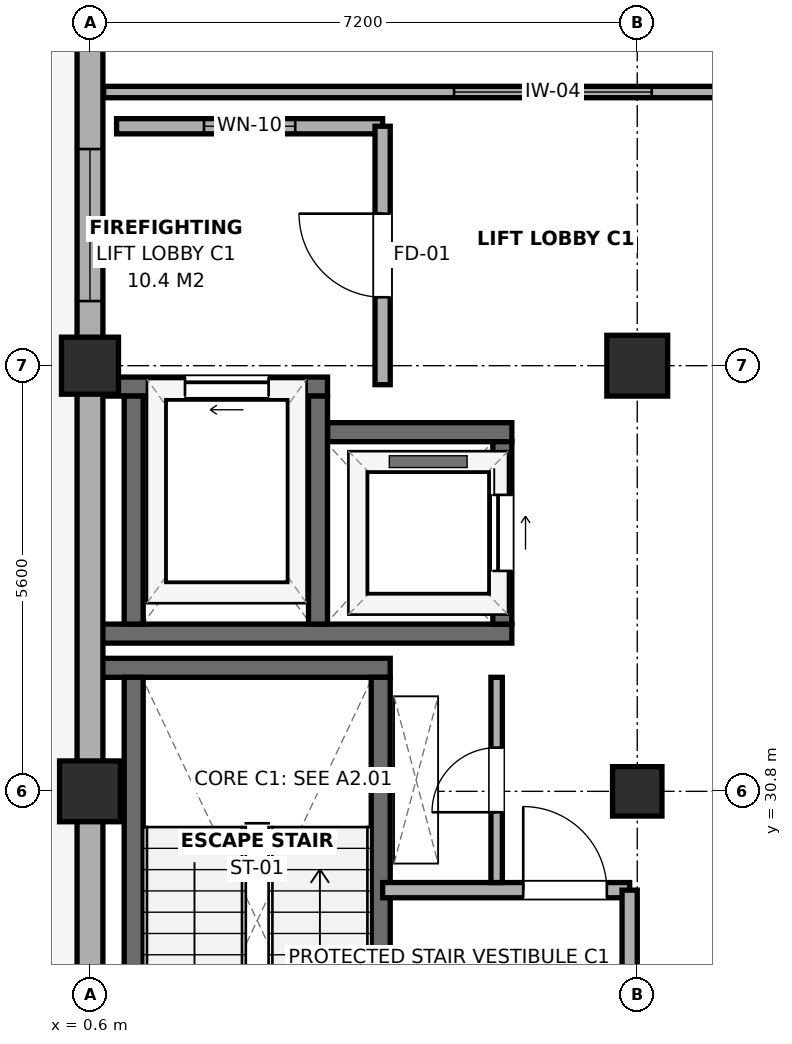
"""IFC4 building model, lengths in metres.
Left out: names, types, materials, properties, quantities, classifications, styles, units other than length and angle.
Written with IfcOpenShell. Run it as: python <this file> out.ifc"""

import sys

from ifc_helpers import new_model, si_unit, direction, frame, frame_2d, origin, origin_2d, place, context, subcontext, project, spatial, rectangle, extrude, element, fill, save


model = new_model("IFC4")
c1 = context("Model", 3, precision=1e-05, world=origin(), true_north=direction((0.0, 1.0)))
c2 = subcontext(c1, "Body", "Model", "MODEL_VIEW")
j1 = project(units=[si_unit("LENGTHUNIT", "METRE"), si_unit("PLANEANGLEUNIT", "RADIAN")], contexts=[c1])
p1 = place(None, origin())
s1 = spatial("IfcSite", under=j1, at=p1, CompositionType="ELEMENT")
p2 = place(p1, origin())
s2 = spatial("IfcBuilding", under=s1, at=p2, CompositionType="ELEMENT")
p3 = place(p2, frame((0.0, 0.0, 4.8)))
s3 = spatial("IfcBuildingStorey", under=s2, at=p3, CompositionType="ELEMENT", Elevation=4.8)
p4 = place(p3, frame((0.6, 30.8, 0.0), z_axis=(0.0, 0.0, 1.0), x_axis=(1.0, 0.0, 0.0)))
e1 = element("IfcColumn", 1, at=p4, inside=s3, PredefinedType="COLUMN", context=c2, shape_type="SweptSolid", body=[
    extrude(rectangle(XDim=0.8, YDim=0.8, at=origin_2d()), origin(), (0.0, 0.0, 1.0), 4.2),
])
p5 = place(p3, frame((0.6, 36.4, 0.0), z_axis=(0.0, 0.0, 1.0), x_axis=(1.0, 0.0, 0.0)))
e2 = element("IfcColumn", 2, at=p5, inside=s3, PredefinedType="COLUMN", context=c2, shape_type="SweptSolid", body=[
    extrude(rectangle(XDim=0.75, YDim=0.75, at=origin_2d()), origin(), (0.0, 0.0, 1.0), 4.2),
])
p6 = place(p3, frame((7.8, 30.8, 0.0), z_axis=(0.0, 0.0, 1.0), x_axis=(1.0, 0.0, 0.0)))
e3 = element("IfcColumn", 3, at=p6, inside=s3, PredefinedType="COLUMN", context=c2, shape_type="SweptSolid", body=[
    extrude(rectangle(XDim=0.65, YDim=0.65, at=origin_2d()), origin(), (0.0, 0.0, 1.0), 4.2),
])
p7 = place(p3, frame((7.8, 36.4, 0.0), z_axis=(0.0, 0.0, 1.0), x_axis=(1.0, 0.0, 0.0)))
e4 = element("IfcColumn", 4, at=p7, inside=s3, PredefinedType="COLUMN", context=c2, shape_type="SweptSolid", body=[
    extrude(rectangle(XDim=0.8, YDim=0.8, at=origin_2d()), origin(), (0.0, 0.0, 1.0), 4.2),
])
p8 = place(p3, frame((0.75, 32.425, 0.0), z_axis=(0.0, 0.0, 1.0), x_axis=(1.0, 0.0, 0.0)))
e5 = element("IfcWall", 5, at=p8, inside=s3, PredefinedType="SHEAR", context=c2, shape_type="SweptSolid", body=[
    extrude(rectangle(XDim=3.8, YDim=0.25, at=frame_2d((1.9, 0.0))), origin(), (0.0, 0.0, 1.0), 3.98),
])
p9 = place(p3, frame((1.175, 25.9, 0.0), z_axis=(0.0, 0.0, 1.0), x_axis=(0.0, 1.0, 0.0)))
e6 = element("IfcWall", 6, at=p9, inside=s3, PredefinedType="SHEAR", context=c2, shape_type="SweptSolid", body=[
    extrude(rectangle(XDim=6.4, YDim=0.25, at=frame_2d((3.2, 0.0))), origin(), (0.0, 0.0, 1.0), 3.98),
])
p10 = place(p3, frame((4.425, 25.9, 0.0), z_axis=(0.0, 0.0, 1.0), x_axis=(0.0, 1.0, 0.0)))
e7 = element("IfcWall", 7, at=p10, inside=s3, PredefinedType="SHEAR", context=c2, shape_type="SweptSolid", body=[
    extrude(rectangle(XDim=6.4, YDim=0.25, at=frame_2d((3.2, 0.0))), origin(), (0.0, 0.0, 1.0), 3.98),
])
p11 = place(p10, frame((0.17, 0.0, 0.0)))
e8 = element("IfcOpeningElement", 8, at=p11, cuts=e7, PredefinedType="OPENING", context=c2, shape_type="SweptSolid", body=[
    extrude(rectangle(XDim=1.1, YDim=2.15, at=frame_2d((0.55, 1.075))), frame((0.0, 0.14, 0.0), z_axis=(0.0, -1.0, 0.0), x_axis=(1.0, 0.0, 0.0)), (0.0, 0.0, 1.0), 0.28),
])
p12 = place(p3, frame((0.75, 32.875, 0.0), z_axis=(0.0, 0.0, 1.0), x_axis=(1.0, 0.0, 0.0)))
e9 = element("IfcWall", 9, at=p12, inside=s3, PredefinedType="SHEAR", context=c2, shape_type="SweptSolid", body=[
    extrude(rectangle(XDim=5.4, YDim=0.25, at=frame_2d((2.7, 0.0))), origin(), (0.0, 0.0, 1.0), 3.98),
])
p13 = place(p3, frame((0.75, 36.125, 0.0), z_axis=(0.0, 0.0, 1.0), x_axis=(1.0, 0.0, 0.0)))
e10 = element("IfcWall", 10, at=p13, inside=s3, PredefinedType="SHEAR", context=c2, shape_type="SweptSolid", body=[
    extrude(rectangle(XDim=2.975, YDim=0.25, at=frame_2d((1.488, 0.0))), origin(), (0.0, 0.0, 1.0), 3.98),
])
p14 = place(p13, frame((1.1, 0.0, 0.0)))
e11 = element("IfcOpeningElement", 11, at=p14, cuts=e10, PredefinedType="OPENING", context=c2, shape_type="SweptSolid", body=[
    extrude(rectangle(XDim=1.1, YDim=2.15, at=frame_2d((0.55, 1.075))), frame((0.0, 0.14, 0.0), z_axis=(0.0, -1.0, 0.0), x_axis=(1.0, 0.0, 0.0)), (0.0, 0.0, 1.0), 0.28),
])
p15 = place(p3, frame((3.725, 35.525, 0.0), z_axis=(0.0, 0.0, 1.0), x_axis=(1.0, 0.0, 0.0)))
e12 = element("IfcWall", 12, at=p15, inside=s3, PredefinedType="SHEAR", context=c2, shape_type="SweptSolid", body=[
    extrude(rectangle(XDim=2.425, YDim=0.25, at=frame_2d((1.212, 0.0))), origin(), (0.0, 0.0, 1.0), 3.98),
])
for number, where, z_axis, x_axis in (
    (13, (1.175, 33.0, 0.0), (0.0, 0.0, 1.0), (0.0, 1.0, 0.0)),
    (14, (3.6, 33.0, 0.0), (0.0, 0.0, 1.0), (0.0, 1.0, 0.0)),
):
    element("IfcWall", number, at=place(p3, frame(where, z_axis=z_axis, x_axis=x_axis)), inside=s3, PredefinedType="SHEAR", context=c2, shape_type="SweptSolid", body=[
        extrude(rectangle(XDim=3.0, YDim=0.25, at=frame_2d((1.5, 0.0))), origin(), (0.0, 0.0, 1.0), 3.98),
    ])
p16 = place(p3, frame((6.025, 33.0, 0.0), z_axis=(0.0, 0.0, 1.0), x_axis=(0.0, 1.0, 0.0)))
e15 = element("IfcWall", 15, at=p16, inside=s3, PredefinedType="SHEAR", context=c2, shape_type="SweptSolid", body=[
    extrude(rectangle(XDim=2.4, YDim=0.25, at=frame_2d((1.2, 0.0))), origin(), (0.0, 0.0, 1.0), 3.98),
])
p17 = place(p16, frame((0.7, 0.0, 0.0)))
e16 = element("IfcOpeningElement", 16, at=p17, cuts=e15, PredefinedType="OPENING", context=c2, shape_type="SweptSolid", body=[
    extrude(rectangle(XDim=1.0, YDim=2.15, at=frame_2d((0.5, 1.075))), frame((0.0, 0.14, 0.0), z_axis=(0.0, -1.0, 0.0), x_axis=(1.0, 0.0, 0.0)), (0.0, 0.0, 1.0), 0.28),
])
p18 = place(p3, frame((0.6, 25.2, 0.0), z_axis=(0.0, 0.0, 1.0), x_axis=(0.0, 1.0, 0.0)))
e17 = element("IfcWall", 17, at=p18, inside=s3, PredefinedType="SOLIDWALL", context=c2, shape_type="SweptSolid", body=[
    extrude(rectangle(XDim=5.6, YDim=0.34, at=frame_2d((2.8, 0.0))), origin(), (0.0, 0.0, 1.0), 3.425),
])
p19 = place(p3, frame((0.6, 30.8, 0.0), z_axis=(0.0, 0.0, 1.0), x_axis=(0.0, 1.0, 0.0)))
e18 = element("IfcWall", 18, at=p19, inside=s3, PredefinedType="SOLIDWALL", context=c2, shape_type="SweptSolid", body=[
    extrude(rectangle(XDim=5.6, YDim=0.34, at=frame_2d((2.8, 0.0))), origin(), (0.0, 0.0, 1.0), 3.475),
])
p20 = place(p3, frame((0.6, 36.4, 0.0), z_axis=(0.0, 0.0, 1.0), x_axis=(0.0, 1.0, 0.0)))
e19 = element("IfcWall", 19, at=p20, inside=s3, PredefinedType="SOLIDWALL", context=c2, shape_type="SweptSolid", body=[
    extrude(rectangle(XDim=5.6, YDim=0.34, at=frame_2d((2.8, 0.0))), origin(), (0.0, 0.0, 1.0), 3.525),
])
p21 = place(p20, frame((0.85, 0.0, 0.9)))
e20 = element("IfcOpeningElement", 20, at=p21, cuts=e19, PredefinedType="OPENING", context=c2, shape_type="SweptSolid", body=[
    extrude(rectangle(XDim=2.0, YDim=1.8, at=frame_2d((1.0, 0.9))), frame((0.0, 0.185, 0.0), z_axis=(0.0, -1.0, 0.0), x_axis=(1.0, 0.0, 0.0)), (0.0, 0.0, 1.0), 0.37),
])
p22 = place(p3, frame((0.95, 39.55, 0.0), z_axis=(0.0, 0.0, 1.0), x_axis=(1.0, 0.0, 0.0)))
e21 = element("IfcWall", 21, at=p22, inside=s3, PredefinedType="PARTITIONING", context=c2, shape_type="SweptSolid", body=[
    extrude(rectangle(XDim=3.5, YDim=0.2, at=frame_2d((1.75, 0.0))), origin(), (0.0, 0.0, 1.0), 3.975),
])
p23 = place(p22, frame((1.15, 0.0, 0.95)))
e22 = element("IfcOpeningElement", 22, at=p23, cuts=e21, PredefinedType="OPENING", context=c2, shape_type="SweptSolid", body=[
    extrude(rectangle(XDim=1.2, YDim=1.5, at=frame_2d((0.6, 0.75))), frame((0.0, 0.115, 0.0), z_axis=(0.0, -1.0, 0.0), x_axis=(1.0, 0.0, 0.0)), (0.0, 0.0, 1.0), 0.23),
])
p24 = place(p3, frame((4.45, 36.15, 0.0), z_axis=(0.0, 0.0, 1.0), x_axis=(0.0, 1.0, 0.0)))
e23 = element("IfcWall", 23, at=p24, inside=s3, PredefinedType="PARTITIONING", context=c2, shape_type="SweptSolid", body=[
    extrude(rectangle(XDim=3.4, YDim=0.2, at=frame_2d((1.7, 0.0))), origin(), (0.0, 0.0, 1.0), 3.375),
])
p25 = place(p24, frame((1.15, 0.0, 0.0)))
e24 = element("IfcOpeningElement", 24, at=p25, cuts=e23, PredefinedType="OPENING", context=c2, shape_type="SweptSolid", body=[
    extrude(rectangle(XDim=1.1, YDim=2.15, at=frame_2d((0.55, 1.075))), frame((0.0, 0.115, 0.0), z_axis=(0.0, -1.0, 0.0), x_axis=(1.0, 0.0, 0.0)), (0.0, 0.0, 1.0), 0.23),
])
p26 = place(p3, frame((4.45, 29.5, 0.0), z_axis=(0.0, 0.0, 1.0), x_axis=(1.0, 0.0, 0.0)))
e25 = element("IfcWall", 25, at=p26, inside=s3, PredefinedType="PARTITIONING", context=c2, shape_type="SweptSolid", body=[
    extrude(rectangle(XDim=3.25, YDim=0.2, at=frame_2d((1.625, 0.0))), origin(), (0.0, 0.0, 1.0), 3.425),
])
p27 = place(p26, frame((1.85, 0.0, 0.0)))
e26 = element("IfcOpeningElement", 26, at=p27, cuts=e25, PredefinedType="OPENING", context=c2, shape_type="SweptSolid", body=[
    extrude(rectangle(XDim=1.1, YDim=2.15, at=frame_2d((0.55, 1.075))), frame((0.0, 0.115, 0.0), z_axis=(0.0, -1.0, 0.0), x_axis=(1.0, 0.0, 0.0)), (0.0, 0.0, 1.0), 0.23),
])
p28 = place(p3, frame((7.7, 25.9, 0.0), z_axis=(0.0, 0.0, 1.0), x_axis=(0.0, 1.0, 0.0)))
e27 = element("IfcWall", 27, at=p28, inside=s3, PredefinedType="PARTITIONING", context=c2, shape_type="SweptSolid", body=[
    extrude(rectangle(XDim=3.6, YDim=0.2, at=frame_2d((1.8, 0.0))), origin(), (0.0, 0.0, 1.0), 3.425),
])
p29 = place(p28, frame((1.25, 0.0, 0.0)))
e28 = element("IfcOpeningElement", 28, at=p29, cuts=e27, PredefinedType="OPENING", context=c2, shape_type="SweptSolid", body=[
    extrude(rectangle(XDim=1.1, YDim=2.15, at=frame_2d((0.55, 1.075))), frame((0.0, 0.115, 0.0), z_axis=(0.0, -1.0, 0.0), x_axis=(1.0, 0.0, 0.0)), (0.0, 0.0, 1.0), 0.23),
])
p30 = place(p3, frame((5.95, 29.6, 0.0), z_axis=(0.0, 0.0, 1.0), x_axis=(0.0, 1.0, 0.0)))
e29 = element("IfcWall", 29, at=p30, inside=s3, PredefinedType="PARTITIONING", context=c2, shape_type="SweptSolid", body=[
    extrude(rectangle(XDim=2.7, YDim=0.15, at=frame_2d((1.35, 0.0))), origin(), (0.0, 0.0, 1.0), 3.975),
])
p31 = place(p30, frame((0.925, 0.0, 0.0)))
e30 = element("IfcOpeningElement", 30, at=p31, cuts=e29, PredefinedType="OPENING", context=c2, shape_type="SweptSolid", body=[
    extrude(rectangle(XDim=0.85, YDim=2.1, at=frame_2d((0.425, 1.05))), frame((0.0, 0.09, 0.0), z_axis=(0.0, -1.0, 0.0), x_axis=(1.0, 0.0, 0.0)), (0.0, 0.0, 1.0), 0.18),
])
p32 = place(p3, frame((0.78, 40.0, 0.0), z_axis=(0.0, 0.0, 1.0), x_axis=(1.0, 0.0, 0.0)))
e31 = element("IfcWall", 31, at=p32, inside=s3, PredefinedType="PARTITIONING", context=c2, shape_type="SweptSolid", body=[
    extrude(rectangle(XDim=11.82, YDim=0.15, at=frame_2d((5.91, 0.0))), origin(), (0.0, 0.0, 1.0), 3.525),
])
p33 = place(p32, frame((4.61, 0.0, 0.95)))
e32 = element("IfcOpeningElement", 32, at=p33, cuts=e31, PredefinedType="OPENING", context=c2, shape_type="SweptSolid", body=[
    extrude(rectangle(XDim=2.6, YDim=1.5, at=frame_2d((1.3, 0.75))), frame((0.0, 0.09, 0.0), z_axis=(0.0, -1.0, 0.0), x_axis=(1.0, 0.0, 0.0)), (0.0, 0.0, 1.0), 0.18),
])
p34 = place(p21, origin())
e33 = element("IfcWindow", 33, at=p34, inside=s3, PartitioningType="SINGLE_PANEL", PredefinedType="WINDOW", context=c2, shape_type="SweptSolid", body=[
    extrude(rectangle(XDim=2.0, YDim=1.8, at=frame_2d((1.0, 0.9))), frame((0.0, 0.03, 0.0), z_axis=(0.0, -1.0, 0.0), x_axis=(1.0, 0.0, 0.0)), (0.0, 0.0, 1.0), 0.06),
])
fill(e20, e33)
p35 = place(p14, origin())
e34 = element("IfcDoor", 34, at=p35, inside=s3, OperationType="SLIDING_TO_LEFT", PredefinedType="DOOR", context=c2, shape_type="SweptSolid", body=[
    extrude(rectangle(XDim=1.1, YDim=2.15, at=frame_2d((0.55, 1.075))), frame((0.0, 0.025, 0.0), z_axis=(0.0, -1.0, 0.0), x_axis=(1.0, 0.0, 0.0)), (0.0, 0.0, 1.0), 0.05),
])
fill(e11, e34)
p36 = place(p17, frame((1.0, 0.0, 0.0), z_axis=(0.0, 0.0, 1.0), x_axis=(-1.0, 0.0, 0.0)))
e35 = element("IfcDoor", 35, at=p36, inside=s3, OperationType="SLIDING_TO_RIGHT", PredefinedType="DOOR", context=c2, shape_type="SweptSolid", body=[
    extrude(rectangle(XDim=1.0, YDim=2.15, at=frame_2d((0.5, 1.075))), frame((0.0, 0.025, 0.0), z_axis=(0.0, -1.0, 0.0), x_axis=(1.0, 0.0, 0.0)), (0.0, 0.0, 1.0), 0.05),
])
fill(e16, e35)
p37 = place(p23, origin())
e36 = element("IfcWindow", 36, at=p37, inside=s3, PartitioningType="SINGLE_PANEL", PredefinedType="WINDOW", context=c2, shape_type="SweptSolid", body=[
    extrude(rectangle(XDim=1.2, YDim=1.5, at=frame_2d((0.6, 0.75))), frame((0.0, 0.03, 0.0), z_axis=(0.0, -1.0, 0.0), x_axis=(1.0, 0.0, 0.0)), (0.0, 0.0, 1.0), 0.06),
])
fill(e22, e36)
p38 = place(p25, origin())
e37 = element("IfcDoor", 37, at=p38, inside=s3, OperationType="SINGLE_SWING_RIGHT", PredefinedType="DOOR", context=c2, shape_type="SweptSolid", body=[
    extrude(rectangle(XDim=1.1, YDim=2.15, at=frame_2d((0.55, 1.075))), frame((0.0, 0.025, 0.0), z_axis=(0.0, -1.0, 0.0), x_axis=(1.0, 0.0, 0.0)), (0.0, 0.0, 1.0), 0.05),
])
fill(e24, e37)
p39 = place(p27, origin())
e38 = element("IfcDoor", 38, at=p39, inside=s3, OperationType="SINGLE_SWING_LEFT", PredefinedType="DOOR", context=c2, shape_type="SweptSolid", body=[
    extrude(rectangle(XDim=1.1, YDim=2.15, at=frame_2d((0.55, 1.075))), frame((0.0, 0.025, 0.0), z_axis=(0.0, -1.0, 0.0), x_axis=(1.0, 0.0, 0.0)), (0.0, 0.0, 1.0), 0.05),
])
fill(e26, e38)
p40 = place(p31, origin())
e39 = element("IfcDoor", 39, at=p40, inside=s3, OperationType="SINGLE_SWING_LEFT", PredefinedType="DOOR", context=c2, shape_type="SweptSolid", body=[
    extrude(rectangle(XDim=0.85, YDim=2.1, at=frame_2d((0.425, 1.05))), frame((0.0, 0.025, 0.0), z_axis=(0.0, -1.0, 0.0), x_axis=(1.0, 0.0, 0.0)), (0.0, 0.0, 1.0), 0.05),
])
fill(e30, e39)
p41 = place(p33, origin())
e40 = element("IfcWindow", 40, at=p41, inside=s3, PartitioningType="SINGLE_PANEL", PredefinedType="WINDOW", context=c2, shape_type="SweptSolid", body=[
    extrude(rectangle(XDim=2.6, YDim=1.5, at=frame_2d((1.3, 0.75))), frame((0.0, 0.03, 0.0), z_axis=(0.0, -1.0, 0.0), x_axis=(1.0, 0.0, 0.0)), (0.0, 0.0, 1.0), 0.06),
])
fill(e32, e40)
save(model, sys.argv[1])
